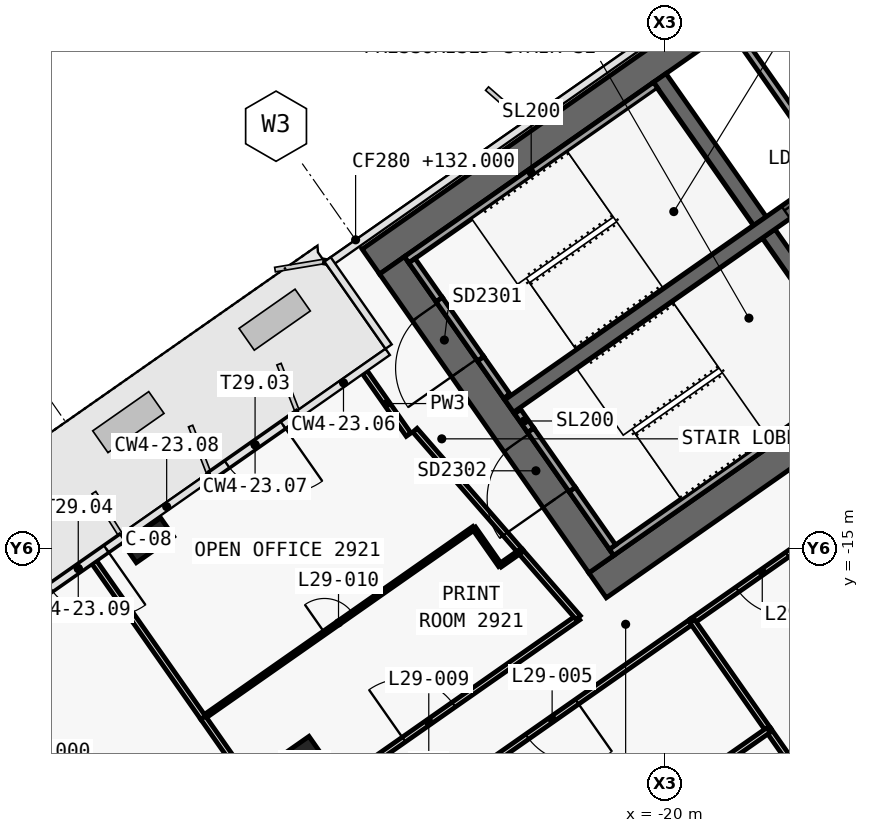
"""IFC4 building model, lengths in metres.
Left out: names, types, materials, properties, quantities, classifications, styles, units other than length and angle.
Written with IfcOpenShell. Run it as: python <this file> out.ifc"""

import sys

from ifc_helpers import new_model, si_unit, direction, frame, frame_2d, origin, origin_2d, place, context, subcontext, project, spatial, polyline, rectangle, outline, extrude, element, fill, save


model = new_model("IFC4")
c1 = context("Model", 3, precision=1e-05, world=origin(), true_north=direction((0.0, 1.0)))
c2 = subcontext(c1, "Body", "Model", "MODEL_VIEW")
j1 = project(units=[si_unit("LENGTHUNIT", "METRE"), si_unit("PLANEANGLEUNIT", "RADIAN")], contexts=[c1])
p1 = place(None, origin())
s1 = spatial("IfcSite", under=j1, at=p1, CompositionType="ELEMENT")
p2 = place(p1, origin())
s2 = spatial("IfcBuilding", under=s1, at=p2, CompositionType="ELEMENT")
p3 = place(p2, frame((0.0, 0.0, 132.0)))
s3 = spatial("IfcBuildingStorey", under=s2, at=p3, CompositionType="ELEMENT", Elevation=132.0)
p4 = place(p3, frame((0.029, 11.984, 0.0), z_axis=(0.0, 0.0, 1.0), x_axis=(-0.819151382952, -0.573577380837, 0.0)))
e1 = element("IfcWall", 1, at=p4, inside=s3, PredefinedType="SHEAR", context=c2, shape_type="SweptSolid", body=[
    extrude(outline(polyline([(33.898, 0.4), (0.56, 0.4), (-0.0, -0.4), (33.898, -0.4), (33.898, 0.4)])), origin(), (0.0, 0.0, 1.0), 3.9),
])
p5 = place(p3, frame((0.029, -0.712, 0.0), z_axis=(0.0, 0.0, 1.0), x_axis=(-0.819151758019, -0.573576845187, 0.0)))
e2 = element("IfcWall", 2, at=p5, inside=s3, PredefinedType="SHEAR", context=c2, shape_type="SweptSolid", body=[
    extrude(outline(polyline([(26.616, 0.4), (0.56, 0.4), (-0.0, -0.4), (26.616, -0.4), (26.616, 0.4)])), origin(), (0.0, 0.0, 1.0), 3.9),
])
p6 = place(p5, frame((2.966, 0.0, 0.0)))
e3 = element("IfcOpeningElement", 3, at=p6, cuts=e2, PredefinedType="OPENING", context=c2, shape_type="SweptSolid", body=[
    extrude(rectangle(XDim=2.4, YDim=2.1, at=frame_2d((1.2, 1.05))), frame((0.0, 0.41, 0.0), z_axis=(0.0, -1.0, 0.0), x_axis=(1.0, 0.0, 0.0)), (0.0, 0.0, 1.0), 0.82),
])
p7 = place(p5, frame((11.916, 0.0, 0.0)))
e4 = element("IfcOpeningElement", 4, at=p7, cuts=e2, PredefinedType="OPENING", context=c2, shape_type="SweptSolid", body=[
    extrude(rectangle(XDim=2.4, YDim=2.1, at=frame_2d((1.2, 1.05))), frame((0.0, 0.41, 0.0), z_axis=(0.0, -1.0, 0.0), x_axis=(1.0, 0.0, 0.0)), (0.0, 0.0, 1.0), 0.82),
])
p8 = place(p3, frame((-21.675, -15.421, 0.0), z_axis=(0.0, 0.0, 1.0), x_axis=(-0.573581815061, 0.819148278049, 0.0)))
e5 = element("IfcWall", 5, at=p8, inside=s3, PredefinedType="SHEAR", context=c2, shape_type="SweptSolid", body=[
    extrude(outline(polyline([(0.0, 0.4), (0.0, -0.4), (9.6, -0.4), (9.6, 0.4), (0.0, 0.4)])), origin(), (0.0, 0.0, 1.0), 3.9),
])
p9 = place(p8, frame((6.3, 0.0, 0.0)))
e6 = element("IfcOpeningElement", 6, at=p9, cuts=e5, PredefinedType="OPENING", context=c2, shape_type="SweptSolid", body=[
    extrude(rectangle(XDim=1.8, YDim=2.1, at=frame_2d((0.9, 1.05))), frame((0.0, 0.41, 0.0), z_axis=(0.0, -1.0, 0.0), x_axis=(1.0, 0.0, 0.0)), (0.0, 0.0, 1.0), 0.82),
])
p10 = place(p8, frame((2.1, 0.0, 0.0)))
e7 = element("IfcOpeningElement", 7, at=p10, cuts=e5, PredefinedType="OPENING", context=c2, shape_type="SweptSolid", body=[
    extrude(rectangle(XDim=1.8, YDim=2.1, at=frame_2d((0.9, 1.05))), frame((0.0, 0.41, 0.0), z_axis=(0.0, -1.0, 0.0), x_axis=(1.0, 0.0, 0.0)), (0.0, 0.0, 1.0), 0.82),
])
p11 = place(p3, frame((-14.63, -10.488, 0.0), z_axis=(0.0, 0.0, 1.0), x_axis=(-0.573611936273, 0.819127185829, 0.0)))
e8 = element("IfcWall", 8, at=p11, inside=s3, PredefinedType="SHEAR", context=c2, shape_type="SweptSolid", body=[
    extrude(outline(polyline([(4.6, 0.2), (0.0, 0.2), (0.0, -0.2), (4.6, -0.2), (4.6, 0.2)])), origin(), (0.0, 0.0, 1.0), 3.9),
])
p12 = place(p3, frame((-17.498, -6.392, 0.0), z_axis=(0.0, 0.0, 1.0), x_axis=(-0.573611936273, 0.819127185829, 0.0)))
e9 = element("IfcWall", 9, at=p12, inside=s3, PredefinedType="SHEAR", context=c2, shape_type="SweptSolid", body=[
    extrude(outline(polyline([(4.6, -0.2), (4.6, 0.2), (0.0, 0.2), (0.0, -0.2), (4.6, -0.2)])), origin(), (0.0, 0.0, 1.0), 3.9),
])
p13 = place(p3, frame((-2.638, 3.768, 0.0), z_axis=(0.0, 0.0, 1.0), x_axis=(-0.81915267502, -0.573575535572, 0.0)))
e10 = element("IfcWall", 10, at=p13, inside=s3, PredefinedType="SHEAR", context=c2, shape_type="SweptSolid", body=[
    extrude(outline(polyline([(26.2, 0.2), (0.0, 0.2), (0.0, -0.2), (26.2, -0.2), (26.2, 0.2)])), origin(), (0.0, 0.0, 1.0), 3.9),
])
p14 = place(p13, frame((1.169, 0.0, 0.0)))
e11 = element("IfcOpeningElement", 11, at=p14, cuts=e10, PredefinedType="OPENING", context=c2, shape_type="SweptSolid", body=[
    extrude(rectangle(XDim=1.1, YDim=2.1, at=frame_2d((0.55, 1.05))), frame((0.0, 0.21, 0.0), z_axis=(0.0, -1.0, 0.0), x_axis=(1.0, 0.0, 0.0)), (0.0, 0.0, 1.0), 0.42),
])
p15 = place(p13, frame((3.206, 0.0, 0.0)))
e12 = element("IfcOpeningElement", 12, at=p15, cuts=e10, PredefinedType="OPENING", context=c2, shape_type="SweptSolid", body=[
    extrude(rectangle(XDim=1.1, YDim=2.1, at=frame_2d((0.55, 1.05))), frame((0.0, 0.21, 0.0), z_axis=(0.0, -1.0, 0.0), x_axis=(1.0, 0.0, 0.0)), (0.0, 0.0, 1.0), 0.42),
])
p16 = place(p13, frame((5.244, 0.0, 0.0)))
e13 = element("IfcOpeningElement", 13, at=p16, cuts=e10, PredefinedType="OPENING", context=c2, shape_type="SweptSolid", body=[
    extrude(rectangle(XDim=1.1, YDim=2.1, at=frame_2d((0.55, 1.05))), frame((0.0, 0.21, 0.0), z_axis=(0.0, -1.0, 0.0), x_axis=(1.0, 0.0, 0.0)), (0.0, 0.0, 1.0), 0.42),
])
p17 = place(p13, frame((7.281, 0.0, 0.0)))
e14 = element("IfcOpeningElement", 14, at=p17, cuts=e10, PredefinedType="OPENING", context=c2, shape_type="SweptSolid", body=[
    extrude(rectangle(XDim=1.1, YDim=2.1, at=frame_2d((0.55, 1.05))), frame((0.0, 0.21, 0.0), z_axis=(0.0, -1.0, 0.0), x_axis=(1.0, 0.0, 0.0)), (0.0, 0.0, 1.0), 0.42),
])
p18 = place(p13, frame((9.688, 0.0, 0.0)))
e15 = element("IfcOpeningElement", 15, at=p18, cuts=e10, PredefinedType="OPENING", context=c2, shape_type="SweptSolid", body=[
    extrude(rectangle(XDim=1.1, YDim=2.1, at=frame_2d((0.55, 1.05))), frame((0.0, 0.21, 0.0), z_axis=(0.0, -1.0, 0.0), x_axis=(1.0, 0.0, 0.0)), (0.0, 0.0, 1.0), 0.42),
])
p19 = place(p13, frame((11.863, 0.0, 0.0)))
e16 = element("IfcOpeningElement", 16, at=p19, cuts=e10, PredefinedType="OPENING", context=c2, shape_type="SweptSolid", body=[
    extrude(rectangle(XDim=1.1, YDim=2.1, at=frame_2d((0.55, 1.05))), frame((0.0, 0.21, 0.0), z_axis=(0.0, -1.0, 0.0), x_axis=(1.0, 0.0, 0.0)), (0.0, 0.0, 1.0), 0.42),
])
p20 = place(p13, frame((14.038, 0.0, 0.0)))
e17 = element("IfcOpeningElement", 17, at=p20, cuts=e10, PredefinedType="OPENING", context=c2, shape_type="SweptSolid", body=[
    extrude(rectangle(XDim=1.1, YDim=2.1, at=frame_2d((0.55, 1.05))), frame((0.0, 0.21, 0.0), z_axis=(0.0, -1.0, 0.0), x_axis=(1.0, 0.0, 0.0)), (0.0, 0.0, 1.0), 0.42),
])
p21 = place(p13, frame((16.212, 0.0, 0.0)))
e18 = element("IfcOpeningElement", 18, at=p21, cuts=e10, PredefinedType="OPENING", context=c2, shape_type="SweptSolid", body=[
    extrude(rectangle(XDim=1.1, YDim=2.1, at=frame_2d((0.55, 1.05))), frame((0.0, 0.21, 0.0), z_axis=(0.0, -1.0, 0.0), x_axis=(1.0, 0.0, 0.0)), (0.0, 0.0, 1.0), 0.42),
])
p22 = place(p3, frame((-33.591, -14.792, 0.0), z_axis=(0.0, 0.0, 1.0), x_axis=(-0.819152044289, -0.573576436351, 0.0)))
e19 = element("IfcColumn", 19, at=p22, inside=s3, PredefinedType="COLUMN", context=c2, shape_type="SweptSolid", body=[
    extrude(rectangle(XDim=1.2, YDim=0.6, at=origin_2d()), origin(), (0.0, 0.0, 1.0), 3.9),
])
p23 = place(p3, frame((-29.49, -20.649, 0.0), z_axis=(0.0, 0.0, 1.0), x_axis=(-0.819152044289, -0.573576436351, 0.0)))
e20 = element("IfcColumn", 20, at=p23, inside=s3, PredefinedType="COLUMN", context=c2, shape_type="SweptSolid", body=[
    extrude(rectangle(XDim=1.0, YDim=1.0, at=origin_2d()), origin(), (0.0, 0.0, 1.0), 3.9),
])
p24 = place(p3, frame((-15.594, -5.059, 0.0), z_axis=(0.0, 0.0, 1.0), x_axis=(-0.573540709186, 0.819177059558, 0.0)))
e21 = element("IfcWall", 21, at=p24, inside=s3, PredefinedType="SOLIDWALL", context=c2, shape_type="SweptSolid", body=[
    extrude(rectangle(XDim=4.6, YDim=0.2, at=frame_2d((2.3, 0.0))), origin(), (0.0, 0.0, 1.0), 3.9),
])
p25 = place(p3, frame((-20.243, -2.821, 0.0), z_axis=(0.0, 0.0, 1.0), x_axis=(-0.819141584393, -0.57359137434, 0.0)))
e22 = element("IfcWall", 22, at=p25, inside=s3, PredefinedType="SOLIDWALL", context=c2, shape_type="SweptSolid", body=[
    extrude(rectangle(XDim=8.0, YDim=0.2, at=frame_2d((4.0, 0.0))), origin(), (0.0, 0.0, 1.0), 3.62),
])
p26 = place(p3, frame((-24.162, -10.998, 0.0), z_axis=(0.0, 0.0, 1.0), x_axis=(-0.573612502218, 0.819126789514, 0.0)))
e23 = element("IfcWall", 23, at=p26, inside=s3, PredefinedType="SOLIDWALL", context=c2, shape_type="SweptSolid", body=[
    extrude(rectangle(XDim=1.2, YDim=0.2, at=frame_2d((0.6, 0.0))), origin(), (0.0, 0.0, 1.0), 3.62),
])
p27 = place(p3, frame((-25.94, -8.458, 0.0), z_axis=(0.0, 0.0, 1.0), x_axis=(-0.573619628835, 0.819121798889, 0.0)))
e24 = element("IfcWall", 24, at=p27, inside=s3, PredefinedType="SOLIDWALL", context=c2, shape_type="SweptSolid", body=[
    extrude(rectangle(XDim=1.25, YDim=0.2, at=frame_2d((0.625, 0.0))), origin(), (0.0, 0.0, 1.0), 3.62),
])
p28 = place(p3, frame((-24.85, -10.014, 2.15), z_axis=(0.0, 0.0, 1.0), x_axis=(-0.573505465124, 0.819201734296, 0.0)))
e25 = element("IfcWall", 25, at=p28, inside=s3, PredefinedType="SOLIDWALL", context=c2, shape_type="SweptSolid", body=[
    extrude(rectangle(XDim=1.9, YDim=0.2, at=frame_2d((0.95, 0.0))), origin(), (0.0, 0.0, 1.0), 1.47),
])
p29 = place(p3, frame((-14.851, -10.521, 0.0), z_axis=(0.0, 0.0, 1.0), x_axis=(-0.819141584393, -0.57359137434, 0.0)))
e26 = element("IfcWall", 26, at=p29, inside=s3, PredefinedType="SOLIDWALL", context=c2, shape_type="SweptSolid", body=[
    extrude(rectangle(XDim=8.0, YDim=0.2, at=frame_2d((4.0, 0.0))), origin(), (0.0, 0.0, 1.0), 3.62),
])
p30 = place(p3, frame((-21.38, -14.97, 0.0), z_axis=(0.0, 0.0, 1.0), x_axis=(-0.573559770908, 0.819163713305, 0.0)))
e27 = element("IfcWall", 27, at=p30, inside=s3, PredefinedType="SOLIDWALL", context=c2, shape_type="SweptSolid", body=[
    extrude(rectangle(XDim=1.85, YDim=0.2, at=frame_2d((0.925, 0.0))), origin(), (0.0, 0.0, 1.0), 3.62),
])
p31 = place(p3, frame((-23.531, -11.898, 0.0), z_axis=(0.0, 0.0, 1.0), x_axis=(-0.573708088123, 0.819059844958, 0.0)))
e28 = element("IfcWall", 28, at=p31, inside=s3, PredefinedType="SOLIDWALL", context=c2, shape_type="SweptSolid", body=[
    extrude(rectangle(XDim=0.6, YDim=0.2, at=frame_2d((0.3, 0.0))), origin(), (0.0, 0.0, 1.0), 3.62),
])
p32 = place(p3, frame((-22.441, -13.455, 2.15), z_axis=(0.0, 0.0, 1.0), x_axis=(-0.573591692345, 0.819141361715, 0.0)))
e29 = element("IfcWall", 29, at=p32, inside=s3, PredefinedType="SOLIDWALL", context=c2, shape_type="SweptSolid", body=[
    extrude(rectangle(XDim=1.9, YDim=0.2, at=frame_2d((0.95, 0.0))), origin(), (0.0, 0.0, 1.0), 1.47),
])
p33 = place(p3, frame((-29.646, -11.481, 0.0), z_axis=(0.0, 0.0, 1.0), x_axis=(-0.819145264869, -0.573586118244, 0.0)))
e30 = element("IfcWall", 30, at=p33, inside=s3, PredefinedType="SOLIDWALL", context=c2, shape_type="SweptSolid", body=[
    extrude(rectangle(XDim=2.78, YDim=0.2, at=frame_2d((1.39, 0.0))), origin(), (0.0, 0.0, 1.0), 3.62),
])
p34 = place(p33, frame((0.49, 0.0, 0.0)))
e31 = element("IfcOpeningElement", 31, at=p34, cuts=e30, PredefinedType="OPENING", context=c2, shape_type="SweptSolid", body=[
    extrude(rectangle(XDim=1.8, YDim=2.4, at=frame_2d((0.9, 1.2))), frame((0.0, 0.11, 0.0), z_axis=(0.0, -1.0, 0.0), x_axis=(1.0, 0.0, 0.0)), (0.0, 0.0, 1.0), 0.22),
])
p35 = place(p3, frame((-34.299, -14.739, 0.0), z_axis=(0.0, 0.0, 1.0), x_axis=(-0.81917415632, -0.573544855802, 0.0)))
e32 = element("IfcWall", 32, at=p35, inside=s3, PredefinedType="SOLIDWALL", context=c2, shape_type="SweptSolid", body=[
    extrude(rectangle(XDim=2.78, YDim=0.2, at=frame_2d((1.39, 0.0))), origin(), (0.0, 0.0, 1.0), 3.62),
])
p36 = place(p35, frame((0.49, 0.0, 0.0)))
e33 = element("IfcOpeningElement", 33, at=p36, cuts=e32, PredefinedType="OPENING", context=c2, shape_type="SweptSolid", body=[
    extrude(rectangle(XDim=1.8, YDim=2.4, at=frame_2d((0.9, 1.2))), frame((0.0, 0.11, 0.0), z_axis=(0.0, -1.0, 0.0), x_axis=(1.0, 0.0, 0.0)), (0.0, 0.0, 1.0), 0.22),
])
p37 = place(p3, frame((-30.146, -22.33, 0.0), z_axis=(0.0, 0.0, 1.0), x_axis=(0.819150657747, 0.573578416533, 0.0)))
e34 = element("IfcWall", 34, at=p37, inside=s3, PredefinedType="PARTITIONING", context=c2, shape_type="SweptSolid", body=[
    extrude(rectangle(XDim=9.599, YDim=0.15, at=frame_2d((4.799, 0.0))), origin(), (0.0, 0.0, 1.0), 3.0),
])
p38 = place(p37, frame((4.0, 0.0, 0.0)))
e35 = element("IfcOpeningElement", 35, at=p38, cuts=e34, PredefinedType="OPENING", context=c2, shape_type="SweptSolid", body=[
    extrude(rectangle(XDim=1.6, YDim=2.1, at=frame_2d((0.8, 1.05))), frame((0.0, 0.085, 0.0), z_axis=(0.0, -1.0, 0.0), x_axis=(1.0, 0.0, 0.0)), (0.0, 0.0, 1.0), 0.17),
])
p39 = place(p3, frame((-15.594, -14.338, 0.0), z_axis=(0.0, 0.0, 1.0), x_axis=(-0.819165703328, -0.573556928727, 0.0)))
e36 = element("IfcWall", 36, at=p39, inside=s3, PredefinedType="PARTITIONING", context=c2, shape_type="SweptSolid", body=[
    extrude(rectangle(XDim=4.504, YDim=0.15, at=frame_2d((2.252, 0.0))), origin(), (0.0, 0.0, 1.0), 3.62),
])
p40 = place(p39, frame((1.452, 0.0, 0.0)))
e37 = element("IfcOpeningElement", 37, at=p40, cuts=e36, PredefinedType="OPENING", context=c2, shape_type="SweptSolid", body=[
    extrude(rectangle(XDim=1.6, YDim=2.1, at=frame_2d((0.8, 1.05))), frame((0.0, 0.085, 0.0), z_axis=(0.0, -1.0, 0.0), x_axis=(1.0, 0.0, 0.0)), (0.0, 0.0, 1.0), 0.17),
])
p41 = place(p3, frame((-19.281, -16.919, 0.0), z_axis=(0.0, 0.0, 1.0), x_axis=(-0.819151661297, -0.57357698332, 0.0)))
e38 = element("IfcWall", 38, at=p41, inside=s3, PredefinedType="PARTITIONING", context=c2, shape_type="SweptSolid", body=[
    extrude(rectangle(XDim=9.004, YDim=0.15, at=frame_2d((4.502, 0.0))), origin(), (0.0, 0.0, 1.0), 3.0),
])
p42 = place(p41, frame((3.702, 0.0, 0.0)))
e39 = element("IfcOpeningElement", 39, at=p42, cuts=e38, PredefinedType="OPENING", context=c2, shape_type="SweptSolid", body=[
    extrude(rectangle(XDim=1.6, YDim=2.1, at=frame_2d((0.8, 1.05))), frame((0.0, 0.085, 0.0), z_axis=(0.0, -1.0, 0.0), x_axis=(1.0, 0.0, 0.0)), (0.0, 0.0, 1.0), 0.17),
])
p43 = place(p3, frame((-26.746, -12.014, 0.0), z_axis=(0.0, 0.0, 1.0), x_axis=(-0.573568836472, 0.819157365729, 0.0)))
e40 = element("IfcWall", 40, at=p43, inside=s3, PredefinedType="PARTITIONING", context=c2, shape_type="SweptSolid", body=[
    extrude(rectangle(XDim=2.0, YDim=0.15, at=frame_2d((1.0, 0.0))), origin(), (0.0, 0.0, 1.0), 3.0),
])
p44 = place(p3, frame((-23.802, -15.082, 0.0), z_axis=(0.0, 0.0, 1.0), x_axis=(-0.656784983898, 0.754077903751, 0.0)))
e41 = element("IfcWall", 41, at=p44, inside=s3, PredefinedType="PARTITIONING", context=c2, shape_type="SweptSolid", body=[
    extrude(rectangle(XDim=4.226, YDim=0.15, at=frame_2d((2.113, 0.0))), origin(), (0.0, 0.0, 1.0), 3.62),
])
p45 = place(p3, frame((-22.284, -16.826, 0.0), z_axis=(0.0, 0.0, 1.0), x_axis=(-0.656749820099, 0.754108529192, 0.0)))
e42 = element("IfcWall", 42, at=p45, inside=s3, PredefinedType="PARTITIONING", context=c2, shape_type="SweptSolid", body=[
    extrude(rectangle(XDim=2.317, YDim=0.15, at=frame_2d((1.159, 0.0))), origin(), (0.0, 0.0, 1.0), 3.0),
])
p46 = place(p3, frame((-24.337, -15.454, 0.0), z_axis=(0.0, 0.0, 1.0), x_axis=(0.819196675611, 0.573512690938, 0.0)))
e43 = element("IfcWall", 43, at=p46, inside=s3, PredefinedType="PARTITIONING", context=c2, shape_type="SweptSolid", body=[
    extrude(rectangle(XDim=0.651, YDim=0.1, at=frame_2d((0.325, 0.0))), origin(), (0.0, 0.0, 1.0), 3.62),
])
p47 = place(p3, frame((-25.026, -14.47, 0.0), z_axis=(0.0, 0.0, 1.0), x_axis=(0.57359875229, -0.819136418047, 0.0)))
e44 = element("IfcWall", 44, at=p47, inside=s3, PredefinedType="PARTITIONING", context=c2, shape_type="SweptSolid", body=[
    extrude(rectangle(XDim=1.201, YDim=0.1, at=frame_2d((0.601, 0.0))), origin(), (0.0, 0.0, 1.0), 3.62),
])
p48 = place(p3, frame((-32.153, -19.46, 0.0), z_axis=(0.0, 0.0, 1.0), x_axis=(0.819139624372, 0.573594173421, 0.0)))
e45 = element("IfcWall", 45, at=p48, inside=s3, PredefinedType="PARTITIONING", context=c2, shape_type="SweptSolid", body=[
    extrude(rectangle(XDim=8.7, YDim=0.1, at=frame_2d((4.35, 0.0))), origin(), (0.0, 0.0, 1.0), 3.0),
])
p49 = place(p48, frame((3.9, 0.0, 0.0)))
e46 = element("IfcOpeningElement", 46, at=p49, cuts=e45, PredefinedType="OPENING", context=c2, shape_type="SweptSolid", body=[
    extrude(rectangle(XDim=0.9, YDim=2.1, at=frame_2d((0.45, 1.05))), frame((0.0, 0.06, 0.0), z_axis=(0.0, -1.0, 0.0), x_axis=(1.0, 0.0, 0.0)), (0.0, 0.0, 1.0), 0.12),
])
p50 = place(p3, frame((-32.153, -19.46, 0.0), z_axis=(0.0, 0.0, 1.0), x_axis=(-0.573590165683, 0.819142430736, 0.0)))
e47 = element("IfcWall", 47, at=p50, inside=s3, PredefinedType="PARTITIONING", context=c2, shape_type="SweptSolid", body=[
    extrude(rectangle(XDim=4.999, YDim=0.15, at=frame_2d((2.5, 0.0))), origin(), (0.0, 0.0, 1.0), 2.9),
])
p51 = place(p3, frame((-30.145, -22.328, 0.0), z_axis=(0.0, 0.0, 1.0), x_axis=(-0.573565328398, 0.819159822049, 0.0)))
e48 = element("IfcWall", 48, at=p51, inside=s3, PredefinedType="PARTITIONING", context=c2, shape_type="SweptSolid", body=[
    extrude(rectangle(XDim=3.5, YDim=0.15, at=frame_2d((1.75, 0.0))), origin(), (0.0, 0.0, 1.0), 3.0),
])
p52 = place(p3, frame((-17.274, -19.789, 0.0), z_axis=(0.0, 0.0, 1.0), x_axis=(-0.573602698703, 0.819133654565, 0.0)))
e49 = element("IfcWall", 49, at=p52, inside=s3, PredefinedType="PARTITIONING", context=c2, shape_type="SweptSolid", body=[
    extrude(rectangle(XDim=3.502, YDim=0.15, at=frame_2d((1.751, 0.0))), origin(), (0.0, 0.0, 1.0), 3.62),
])
p53 = place(p3, frame((-14.98, -23.063, 0.0), z_axis=(0.0, 0.0, 1.0), x_axis=(-0.57356471828, 0.819160249246, 0.0)))
e50 = element("IfcWall", 50, at=p53, inside=s3, PredefinedType="PARTITIONING", context=c2, shape_type="SweptSolid", body=[
    extrude(rectangle(XDim=4.001, YDim=0.15, at=frame_2d((2.0, 0.0))), origin(), (0.0, 0.0, 1.0), 2.9),
])
p54 = place(p3, frame((-17.275, -19.787, 0.0), z_axis=(0.0, 0.0, 1.0), x_axis=(-0.819154173185, -0.573573395961, 0.0)))
e51 = element("IfcWall", 51, at=p54, inside=s3, PredefinedType="PARTITIONING", context=c2, shape_type="SweptSolid", body=[
    extrude(rectangle(XDim=9.0, YDim=0.15, at=frame_2d((4.5, 0.0))), origin(), (0.0, 0.0, 1.0), 3.0),
])
p55 = place(p21, origin())
e52 = element("IfcDoor", 52, at=p55, inside=s3, OperationType="SLIDING_TO_RIGHT", PredefinedType="DOOR", context=c2, shape_type="SweptSolid", body=[
    extrude(rectangle(XDim=1.1, YDim=2.1, at=frame_2d((0.55, 1.05))), frame((0.0, 0.025, 0.0), z_axis=(0.0, -1.0, 0.0), x_axis=(1.0, 0.0, 0.0)), (0.0, 0.0, 1.0), 0.05),
])
fill(e18, e52)
p56 = place(p9, origin())
e53 = element("IfcDoor", 53, at=p56, inside=s3, OperationType="DOUBLE_DOOR_SINGLE_SWING", PredefinedType="DOOR", context=c2, shape_type="SweptSolid", body=[
    extrude(rectangle(XDim=1.8, YDim=2.1, at=frame_2d((0.9, 1.05))), frame((0.0, 0.025, 0.0), z_axis=(0.0, -1.0, 0.0), x_axis=(1.0, 0.0, 0.0)), (0.0, 0.0, 1.0), 0.05),
])
fill(e6, e53)
p57 = place(p10, origin())
e54 = element("IfcDoor", 54, at=p57, inside=s3, OperationType="DOUBLE_DOOR_SINGLE_SWING", PredefinedType="DOOR", context=c2, shape_type="SweptSolid", body=[
    extrude(rectangle(XDim=1.8, YDim=2.1, at=frame_2d((0.9, 1.05))), frame((0.0, 0.025, 0.0), z_axis=(0.0, -1.0, 0.0), x_axis=(1.0, 0.0, 0.0)), (0.0, 0.0, 1.0), 0.05),
])
fill(e7, e54)
p58 = place(p34, origin())
e55 = element("IfcDoor", 55, at=p58, inside=s3, OperationType="DOUBLE_DOOR_DOUBLE_SWING", PredefinedType="DOOR", context=c2, shape_type="SweptSolid", body=[
    extrude(rectangle(XDim=1.8, YDim=2.4, at=frame_2d((0.9, 1.2))), frame((0.0, 0.025, 0.0), z_axis=(0.0, -1.0, 0.0), x_axis=(1.0, 0.0, 0.0)), (0.0, 0.0, 1.0), 0.05),
])
fill(e31, e55)
p59 = place(p36, origin())
e56 = element("IfcDoor", 56, at=p59, inside=s3, OperationType="DOUBLE_DOOR_DOUBLE_SWING", PredefinedType="DOOR", context=c2, shape_type="SweptSolid", body=[
    extrude(rectangle(XDim=1.8, YDim=2.4, at=frame_2d((0.9, 1.2))), frame((0.0, 0.025, 0.0), z_axis=(0.0, -1.0, 0.0), x_axis=(1.0, 0.0, 0.0)), (0.0, 0.0, 1.0), 0.05),
])
fill(e33, e56)
p60 = place(p40, origin())
e57 = element("IfcDoor", 57, at=p60, inside=s3, OperationType="DOUBLE_DOOR_SINGLE_SWING", PredefinedType="DOOR", context=c2, shape_type="SweptSolid", body=[
    extrude(rectangle(XDim=1.6, YDim=2.1, at=frame_2d((0.8, 1.05))), frame((0.0, 0.025, 0.0), z_axis=(0.0, -1.0, 0.0), x_axis=(1.0, 0.0, 0.0)), (0.0, 0.0, 1.0), 0.05),
])
fill(e37, e57)
p61 = place(p42, origin())
e58 = element("IfcDoor", 58, at=p61, inside=s3, OperationType="DOUBLE_DOOR_SINGLE_SWING", PredefinedType="DOOR", context=c2, shape_type="SweptSolid", body=[
    extrude(rectangle(XDim=1.6, YDim=2.1, at=frame_2d((0.8, 1.05))), frame((0.0, 0.025, 0.0), z_axis=(0.0, -1.0, 0.0), x_axis=(1.0, 0.0, 0.0)), (0.0, 0.0, 1.0), 0.05),
])
fill(e39, e58)
p62 = place(p38, origin())
e59 = element("IfcDoor", 59, at=p62, inside=s3, OperationType="DOUBLE_DOOR_SINGLE_SWING", PredefinedType="DOOR", context=c2, shape_type="SweptSolid", body=[
    extrude(rectangle(XDim=1.6, YDim=2.1, at=frame_2d((0.8, 1.05))), frame((0.0, 0.025, 0.0), z_axis=(0.0, -1.0, 0.0), x_axis=(1.0, 0.0, 0.0)), (0.0, 0.0, 1.0), 0.05),
])
fill(e35, e59)
p63 = place(p49, origin())
e60 = element("IfcDoor", 60, at=p63, inside=s3, OperationType="SINGLE_SWING_RIGHT", PredefinedType="DOOR", context=c2, shape_type="SweptSolid", body=[
    extrude(rectangle(XDim=0.9, YDim=2.1, at=frame_2d((0.45, 1.05))), frame((0.0, 0.025, 0.0), z_axis=(0.0, -1.0, 0.0), x_axis=(1.0, 0.0, 0.0)), (0.0, 0.0, 1.0), 0.05),
])
fill(e46, e60)
save(model, sys.argv[1])
